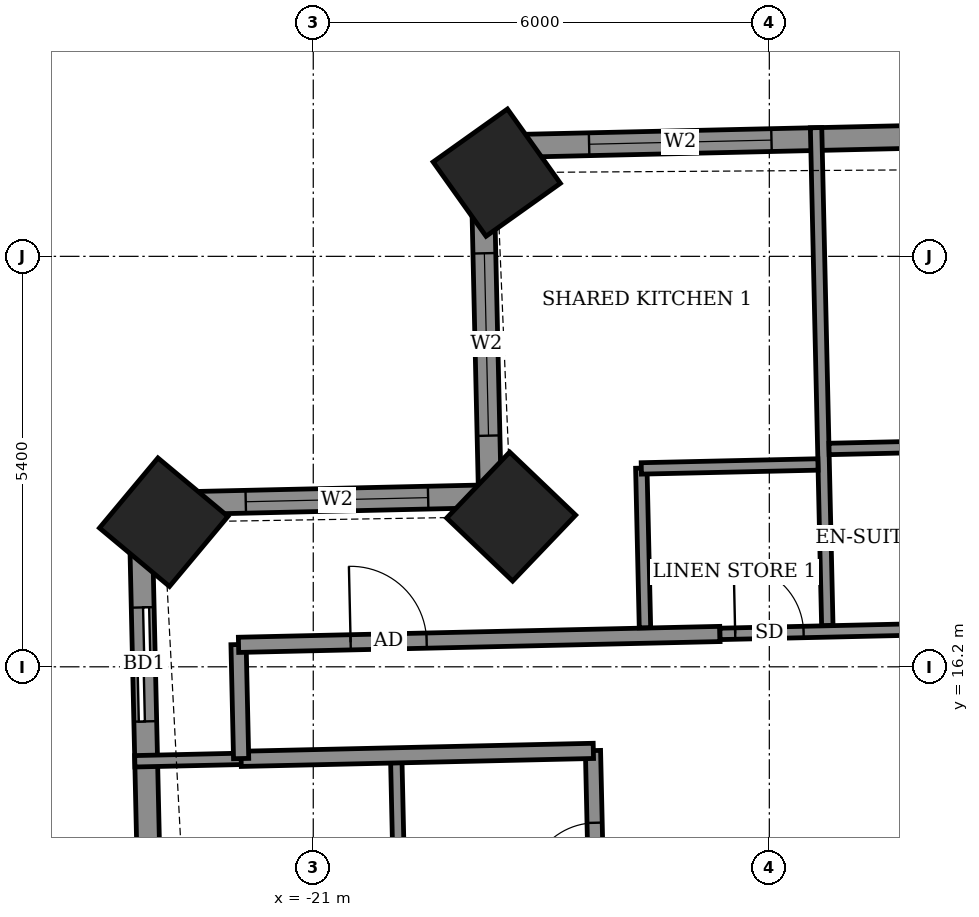
"""IFC4 building model, lengths in metres.
Left out: names, types, materials, properties, quantities, classifications, styles, units other than length and angle.
Written with IfcOpenShell. Run it as: python <this file> out.ifc"""

import sys

from ifc_helpers import new_model, si_unit, direction, frame, frame_2d, origin, origin_2d, place, context, subcontext, project, spatial, rectangle, extrude, element, fill, save


model = new_model("IFC4")
c1 = context("Model", 3, precision=1e-05, world=origin(), true_north=direction((0.0, 1.0)))
c2 = subcontext(c1, "Body", "Model", "MODEL_VIEW")
j1 = project(units=[si_unit("LENGTHUNIT", "METRE"), si_unit("PLANEANGLEUNIT", "RADIAN")], contexts=[c1])
p1 = place(None, origin())
s1 = spatial("IfcSite", under=j1, at=p1, CompositionType="ELEMENT")
p2 = place(p1, origin())
s2 = spatial("IfcBuilding", under=s1, at=p2, CompositionType="ELEMENT")
p3 = place(p2, frame((0.0, 0.0, 175.3)))
s3 = spatial("IfcBuildingStorey", under=s2, at=p3, CompositionType="ELEMENT", Elevation=175.3)
for number, where, z_axis, x_axis in (
    (1, (-18.586, 22.701, -0.55), (0.0, 0.0, 1.0), (-0.815, -0.58, 0.0)),
    (2, (-18.396, 18.177, -0.55), (0.0, 0.0, 1.0), (-0.691, -0.723, 0.0)),
    (3, (-22.968, 18.103, -0.55), (0.0, 0.0, 1.0), (-0.641, -0.768, 0.0)),
):
    element("IfcColumn", number, at=place(p3, frame(where, z_axis=z_axis, x_axis=x_axis)), inside=s3, PredefinedType="COLUMN", context=c2, shape_type="SweptSolid", body=[
        extrude(rectangle(XDim=1.2, YDim=1.2, at=origin_2d()), origin(), (0.0, 0.0, 1.0), 3.6),
    ])
p4 = place(p3, frame((21.589, 23.959, 0.0), z_axis=(0.0, 0.0, 1.0), x_axis=(-0.999742671382, -0.022684598702, 0.0)))
e4 = element("IfcWall", 4, at=p4, inside=s3, PredefinedType="SOLIDWALL", context=c2, shape_type="SweptSolid", body=[
    extrude(rectangle(XDim=40.381, YDim=0.3, at=frame_2d((20.19, 0.0))), origin(), (0.0, 0.0, 1.0), 3.05),
])
p5 = place(p4, frame((1.853, 0.0, 0.0)))
e5 = element("IfcOpeningElement", 5, at=p5, cuts=e4, PredefinedType="OPENING", context=c2, shape_type="SweptSolid", body=[
    extrude(rectangle(XDim=1.5, YDim=2.4, at=frame_2d((0.75, 1.2))), frame((0.0, 0.16, 0.0), z_axis=(0.0, -1.0, 0.0), x_axis=(1.0, 0.0, 0.0)), (0.0, 0.0, 1.0), 0.32),
])
p6 = place(p4, frame((7.38, 0.0, 0.0)))
e6 = element("IfcOpeningElement", 6, at=p6, cuts=e4, PredefinedType="OPENING", context=c2, shape_type="SweptSolid", body=[
    extrude(rectangle(XDim=1.2, YDim=2.4, at=frame_2d((0.6, 1.2))), frame((0.0, 0.16, 0.0), z_axis=(0.0, -1.0, 0.0), x_axis=(1.0, 0.0, 0.0)), (0.0, 0.0, 1.0), 0.32),
])
p7 = place(p4, frame((10.27, 0.0, 0.0)))
e7 = element("IfcOpeningElement", 7, at=p7, cuts=e4, PredefinedType="OPENING", context=c2, shape_type="SweptSolid", body=[
    extrude(rectangle(XDim=1.5, YDim=2.4, at=frame_2d((0.75, 1.2))), frame((0.0, 0.16, 0.0), z_axis=(0.0, -1.0, 0.0), x_axis=(1.0, 0.0, 0.0)), (0.0, 0.0, 1.0), 0.32),
])
p8 = place(p4, frame((15.095, 0.0, 0.0)))
e8 = element("IfcOpeningElement", 8, at=p8, cuts=e4, PredefinedType="OPENING", context=c2, shape_type="SweptSolid", body=[
    extrude(rectangle(XDim=1.5, YDim=2.4, at=frame_2d((0.75, 1.2))), frame((0.0, 0.16, 0.0), z_axis=(0.0, -1.0, 0.0), x_axis=(1.0, 0.0, 0.0)), (0.0, 0.0, 1.0), 0.32),
])
p9 = place(p4, frame((20.935, 0.0, 0.0)))
e9 = element("IfcOpeningElement", 9, at=p9, cuts=e4, PredefinedType="OPENING", context=c2, shape_type="SweptSolid", body=[
    extrude(rectangle(XDim=1.2, YDim=2.4, at=frame_2d((0.6, 1.2))), frame((0.0, 0.16, 0.0), z_axis=(0.0, -1.0, 0.0), x_axis=(1.0, 0.0, 0.0)), (0.0, 0.0, 1.0), 0.32),
])
p10 = place(p4, frame((23.825, 0.0, 0.0)))
e10 = element("IfcOpeningElement", 10, at=p10, cuts=e4, PredefinedType="OPENING", context=c2, shape_type="SweptSolid", body=[
    extrude(rectangle(XDim=1.5, YDim=2.4, at=frame_2d((0.75, 1.2))), frame((0.0, 0.16, 0.0), z_axis=(0.0, -1.0, 0.0), x_axis=(1.0, 0.0, 0.0)), (0.0, 0.0, 1.0), 0.32),
])
p11 = place(p4, frame((28.65, 0.0, 0.0)))
e11 = element("IfcOpeningElement", 11, at=p11, cuts=e4, PredefinedType="OPENING", context=c2, shape_type="SweptSolid", body=[
    extrude(rectangle(XDim=1.5, YDim=2.4, at=frame_2d((0.75, 1.2))), frame((0.0, 0.16, 0.0), z_axis=(0.0, -1.0, 0.0), x_axis=(1.0, 0.0, 0.0)), (0.0, 0.0, 1.0), 0.32),
])
p12 = place(p4, frame((31.84, 0.0, 0.0)))
e12 = element("IfcOpeningElement", 12, at=p12, cuts=e4, PredefinedType="OPENING", context=c2, shape_type="SweptSolid", body=[
    extrude(rectangle(XDim=1.2, YDim=2.4, at=frame_2d((0.6, 1.2))), frame((0.0, 0.16, 0.0), z_axis=(0.0, -1.0, 0.0), x_axis=(1.0, 0.0, 0.0)), (0.0, 0.0, 1.0), 0.32),
])
p13 = place(p4, frame((36.57, 0.0, 0.9)))
e13 = element("IfcOpeningElement", 13, at=p13, cuts=e4, PredefinedType="OPENING", context=c2, shape_type="SweptSolid", body=[
    extrude(rectangle(XDim=2.4, YDim=1.5, at=frame_2d((1.2, 0.75))), frame((0.0, 0.16, 0.0), z_axis=(0.0, -1.0, 0.0), x_axis=(1.0, 0.0, 0.0)), (0.0, 0.0, 1.0), 0.32),
])
p14 = place(p3, frame((-18.781, 23.043, 0.0), z_axis=(0.0, 0.0, 1.0), x_axis=(0.022821468877, -0.999739556364, 0.0)))
e14 = element("IfcWall", 14, at=p14, inside=s3, PredefinedType="SOLIDWALL", context=c2, shape_type="SweptSolid", body=[
    extrude(rectangle(XDim=4.6, YDim=0.3, at=frame_2d((2.3, 0.0))), origin(), (0.0, 0.0, 1.0), 2.55),
])
p15 = place(p14, frame((1.403, 0.0, 0.9)))
e15 = element("IfcOpeningElement", 15, at=p15, cuts=e14, PredefinedType="OPENING", context=c2, shape_type="SweptSolid", body=[
    extrude(rectangle(XDim=2.4, YDim=1.5, at=frame_2d((1.2, 0.75))), frame((0.0, 0.16, 0.0), z_axis=(0.0, -1.0, 0.0), x_axis=(1.0, 0.0, 0.0)), (0.0, 0.0, 1.0), 0.32),
])
p16 = place(p3, frame((-18.676, 18.444, 0.0), z_axis=(0.0, 0.0, 1.0), x_axis=(-0.999744377441, -0.022609285172, 0.0)))
e16 = element("IfcWall", 16, at=p16, inside=s3, PredefinedType="SOLIDWALL", context=c2, shape_type="SweptSolid", body=[
    extrude(rectangle(XDim=4.6, YDim=0.3, at=frame_2d((2.3, 0.0))), origin(), (0.0, 0.0, 1.0), 2.55),
])
p17 = place(p16, frame((0.813, 0.0, 0.9)))
e17 = element("IfcOpeningElement", 17, at=p17, cuts=e16, PredefinedType="OPENING", context=c2, shape_type="SweptSolid", body=[
    extrude(rectangle(XDim=2.4, YDim=1.5, at=frame_2d((1.2, 0.75))), frame((0.0, 0.16, 0.0), z_axis=(0.0, -1.0, 0.0), x_axis=(1.0, 0.0, 0.0)), (0.0, 0.0, 1.0), 0.32),
])
p18 = place(p3, frame((-23.275, 18.34, 0.0), z_axis=(0.0, 0.0, 1.0), x_axis=(0.022705985163, -0.999742185885, 0.0)))
e18 = element("IfcWall", 18, at=p18, inside=s3, PredefinedType="SOLIDWALL", context=c2, shape_type="SweptSolid", body=[
    extrude(rectangle(XDim=10.43, YDim=0.3, at=frame_2d((5.215, 0.0))), origin(), (0.0, 0.0, 1.0), 3.05),
])
p19 = place(p18, frame((1.359, 0.0, 0.0)))
e19 = element("IfcOpeningElement", 19, at=p19, cuts=e18, PredefinedType="OPENING", context=c2, shape_type="SweptSolid", body=[
    extrude(rectangle(XDim=1.5, YDim=2.4, at=frame_2d((0.75, 1.2))), frame((0.0, 0.16, 0.0), z_axis=(0.0, -1.0, 0.0), x_axis=(1.0, 0.0, 0.0)), (0.0, 0.0, 1.0), 0.32),
])
p20 = place(p18, frame((6.543, 0.0, 0.9)))
e20 = element("IfcOpeningElement", 20, at=p20, cuts=e18, PredefinedType="OPENING", context=c2, shape_type="SweptSolid", body=[
    extrude(rectangle(XDim=2.4, YDim=1.5, at=frame_2d((1.2, 0.75))), frame((0.0, 0.16, 0.0), z_axis=(0.0, -1.0, 0.0), x_axis=(1.0, 0.0, 0.0)), (0.0, 0.0, 1.0), 0.32),
])
p21 = place(p3, frame((-16.684, -12.919, 0.0), z_axis=(0.0, 0.0, 1.0), x_axis=(-0.022694293906, 0.999742451346, 0.0)))
e21 = element("IfcWall", 21, at=p21, inside=s3, PredefinedType="PARTITIONING", context=c2, shape_type="SweptSolid", body=[
    extrude(rectangle(XDim=28.024, YDim=0.2, at=frame_2d((14.012, 0.0))), origin(), (0.0, 0.0, 1.0), 3.05),
])
p22 = place(p21, frame((22.625, 0.0, 0.0)))
e22 = element("IfcOpeningElement", 22, at=p22, cuts=e21, PredefinedType="OPENING", context=c2, shape_type="SweptSolid", body=[
    extrude(rectangle(XDim=1.0, YDim=2.1, at=frame_2d((0.5, 1.05))), frame((0.0, 0.11, 0.0), z_axis=(0.0, -1.0, 0.0), x_axis=(1.0, 0.0, 0.0)), (0.0, 0.0, 1.0), 0.22),
])
p23 = place(p21, frame((26.174, 0.0, 0.0)))
e23 = element("IfcOpeningElement", 23, at=p23, cuts=e21, PredefinedType="OPENING", context=c2, shape_type="SweptSolid", body=[
    extrude(rectangle(XDim=0.9, YDim=2.1, at=frame_2d((0.45, 1.05))), frame((0.0, 0.11, 0.0), z_axis=(0.0, -1.0, 0.0), x_axis=(1.0, 0.0, 0.0)), (0.0, 0.0, 1.0), 0.22),
])
p24 = place(p21, frame((16.432, 0.0, 0.0)))
e24 = element("IfcOpeningElement", 24, at=p24, cuts=e21, PredefinedType="OPENING", context=c2, shape_type="SweptSolid", body=[
    extrude(rectangle(XDim=1.0, YDim=2.1, at=frame_2d((0.5, 1.05))), frame((0.0, 0.11, 0.0), z_axis=(0.0, -1.0, 0.0), x_axis=(1.0, 0.0, 0.0)), (0.0, 0.0, 1.0), 0.22),
])
p25 = place(p21, frame((10.975, 0.0, 0.0)))
e25 = element("IfcOpeningElement", 25, at=p25, cuts=e21, PredefinedType="OPENING", context=c2, shape_type="SweptSolid", body=[
    extrude(rectangle(XDim=1.0, YDim=2.1, at=frame_2d((0.5, 1.05))), frame((0.0, 0.11, 0.0), z_axis=(0.0, -1.0, 0.0), x_axis=(1.0, 0.0, 0.0)), (0.0, 0.0, 1.0), 0.22),
])
p26 = place(p21, frame((8.025, 0.0, 0.0)))
e26 = element("IfcOpeningElement", 26, at=p26, cuts=e21, PredefinedType="OPENING", context=c2, shape_type="SweptSolid", body=[
    extrude(rectangle(XDim=0.9, YDim=2.1, at=frame_2d((0.45, 1.05))), frame((0.0, 0.11, 0.0), z_axis=(0.0, -1.0, 0.0), x_axis=(1.0, 0.0, 0.0)), (0.0, 0.0, 1.0), 0.22),
])
p27 = place(p21, frame((5.113, 0.0, 0.0)))
e27 = element("IfcOpeningElement", 27, at=p27, cuts=e21, PredefinedType="OPENING", context=c2, shape_type="SweptSolid", body=[
    extrude(rectangle(XDim=1.0, YDim=2.1, at=frame_2d((0.5, 1.05))), frame((0.0, 0.11, 0.0), z_axis=(0.0, -1.0, 0.0), x_axis=(1.0, 0.0, 0.0)), (0.0, 0.0, 1.0), 0.22),
])
p28 = place(p3, frame((-19.846, 12.24, 0.0), z_axis=(0.0, 0.0, 1.0), x_axis=(-0.02260842146, 0.999744396973, 0.0)))
e28 = element("IfcWall", 28, at=p28, inside=s3, PredefinedType="PARTITIONING", context=c2, shape_type="SweptSolid", body=[
    extrude(rectangle(XDim=2.7, YDim=0.15, at=frame_2d((1.35, 0.0))), origin(), (0.0, 0.0, 1.0), 3.05),
])
p29 = place(p3, frame((-23.348, 14.957, 0.0), z_axis=(0.0, 0.0, 1.0), x_axis=(0.999740216184, 0.022792545827, 0.0)))
e29 = element("IfcWall", 29, at=p29, inside=s3, PredefinedType="PARTITIONING", context=c2, shape_type="SweptSolid", body=[
    extrude(rectangle(XDim=1.403, YDim=0.15, at=frame_2d((0.702, 0.0))), origin(), (0.0, 0.0, 1.0), 2.55),
])
p30 = place(p3, frame((-21.949, 14.989, 0.0), z_axis=(0.0, 0.0, 1.0), x_axis=(0.999743491588, 0.022648422179, 0.0)))
e30 = element("IfcWall", 30, at=p30, inside=s3, PredefinedType="PARTITIONING", context=c2, shape_type="SweptSolid", body=[
    extrude(rectangle(XDim=4.635, YDim=0.2, at=frame_2d((2.318, 0.0))), origin(), (0.0, 0.0, 1.0), 3.05),
])
p31 = place(p3, frame((-21.949, 14.993, 0.0), z_axis=(0.0, 0.0, 1.0), x_axis=(-0.022617910375, 0.999744182344, 0.0)))
e31 = element("IfcWall", 31, at=p31, inside=s3, PredefinedType="PARTITIONING", context=c2, shape_type="SweptSolid", body=[
    extrude(rectangle(XDim=1.5, YDim=0.2, at=frame_2d((0.75, 0.0))), origin(), (0.0, 0.0, 1.0), 3.05),
])
p32 = place(p3, frame((-21.983, 16.489, 0.0), z_axis=(0.0, 0.0, 1.0), x_axis=(0.999744930163, 0.022584831499, 0.0)))
e32 = element("IfcWall", 32, at=p32, inside=s3, PredefinedType="PARTITIONING", context=c2, shape_type="SweptSolid", body=[
    extrude(rectangle(XDim=6.335, YDim=0.2, at=frame_2d((3.167, 0.0))), origin(), (0.0, 0.0, 1.0), 3.05),
])
p33 = place(p32, frame((1.475, 0.0, 0.0)))
e33 = element("IfcOpeningElement", 33, at=p33, cuts=e32, PredefinedType="OPENING", context=c2, shape_type="SweptSolid", body=[
    extrude(rectangle(XDim=1.0, YDim=2.1, at=frame_2d((0.5, 1.05))), frame((0.0, 0.11, 0.0), z_axis=(0.0, -1.0, 0.0), x_axis=(1.0, 0.0, 0.0)), (0.0, 0.0, 1.0), 0.22),
])
p34 = place(p3, frame((-15.649, 16.633, 0.0), z_axis=(0.0, 0.0, 1.0), x_axis=(0.999743261737, 0.022658565952, 0.0)))
e34 = element("IfcWall", 34, at=p34, inside=s3, PredefinedType="PARTITIONING", context=c2, shape_type="SweptSolid", body=[
    extrude(rectangle(XDim=30.536, YDim=0.15, at=frame_2d((15.268, 0.0))), origin(), (0.0, 0.0, 1.0), 3.05),
])
p35 = place(p34, frame((24.44, 0.0, 0.0)))
e35 = element("IfcOpeningElement", 35, at=p35, cuts=e34, PredefinedType="OPENING", context=c2, shape_type="SweptSolid", body=[
    extrude(rectangle(XDim=0.9, YDim=2.1, at=frame_2d((0.45, 1.05))), frame((0.0, 0.085, 0.0), z_axis=(0.0, -1.0, 0.0), x_axis=(1.0, 0.0, 0.0)), (0.0, 0.0, 1.0), 0.17),
])
p36 = place(p34, frame((22.365, 0.0, 0.0)))
e36 = element("IfcOpeningElement", 36, at=p36, cuts=e34, PredefinedType="OPENING", context=c2, shape_type="SweptSolid", body=[
    extrude(rectangle(XDim=0.9, YDim=2.1, at=frame_2d((0.45, 1.05))), frame((0.0, 0.085, 0.0), z_axis=(0.0, -1.0, 0.0), x_axis=(1.0, 0.0, 0.0)), (0.0, 0.0, 1.0), 0.17),
])
p37 = place(p34, frame((15.515, 0.0, 0.0)))
e37 = element("IfcOpeningElement", 37, at=p37, cuts=e34, PredefinedType="OPENING", context=c2, shape_type="SweptSolid", body=[
    extrude(rectangle(XDim=0.9, YDim=2.1, at=frame_2d((0.45, 1.05))), frame((0.0, 0.085, 0.0), z_axis=(0.0, -1.0, 0.0), x_axis=(1.0, 0.0, 0.0)), (0.0, 0.0, 1.0), 0.17),
])
p38 = place(p34, frame((13.44, 0.0, 0.0)))
e38 = element("IfcOpeningElement", 38, at=p38, cuts=e34, PredefinedType="OPENING", context=c2, shape_type="SweptSolid", body=[
    extrude(rectangle(XDim=0.9, YDim=2.1, at=frame_2d((0.45, 1.05))), frame((0.0, 0.085, 0.0), z_axis=(0.0, -1.0, 0.0), x_axis=(1.0, 0.0, 0.0)), (0.0, 0.0, 1.0), 0.17),
])
p39 = place(p34, frame((6.565, 0.0, 0.0)))
e39 = element("IfcOpeningElement", 39, at=p39, cuts=e34, PredefinedType="OPENING", context=c2, shape_type="SweptSolid", body=[
    extrude(rectangle(XDim=0.9, YDim=2.1, at=frame_2d((0.45, 1.05))), frame((0.0, 0.085, 0.0), z_axis=(0.0, -1.0, 0.0), x_axis=(1.0, 0.0, 0.0)), (0.0, 0.0, 1.0), 0.17),
])
p40 = place(p34, frame((4.415, 0.0, 0.0)))
e40 = element("IfcOpeningElement", 40, at=p40, cuts=e34, PredefinedType="OPENING", context=c2, shape_type="SweptSolid", body=[
    extrude(rectangle(XDim=0.9, YDim=2.1, at=frame_2d((0.45, 1.05))), frame((0.0, 0.085, 0.0), z_axis=(0.0, -1.0, 0.0), x_axis=(1.0, 0.0, 0.0)), (0.0, 0.0, 1.0), 0.17),
])
p41 = place(p34, frame((0.2, 0.0, 0.0)))
e41 = element("IfcOpeningElement", 41, at=p41, cuts=e34, PredefinedType="OPENING", context=c2, shape_type="SweptSolid", body=[
    extrude(rectangle(XDim=0.9, YDim=2.1, at=frame_2d((0.45, 1.05))), frame((0.0, 0.085, 0.0), z_axis=(0.0, -1.0, 0.0), x_axis=(1.0, 0.0, 0.0)), (0.0, 0.0, 1.0), 0.17),
])
p42 = place(p3, frame((-16.636, 16.714, 0.0), z_axis=(0.0, 0.0, 1.0), x_axis=(-0.022898307927, 0.999737799372, 0.0)))
e42 = element("IfcWall", 42, at=p42, inside=s3, PredefinedType="PARTITIONING", context=c2, shape_type="SweptSolid", body=[
    extrude(rectangle(XDim=2.1, YDim=0.15, at=frame_2d((1.05, 0.0))), origin(), (0.0, 0.0, 1.0), 3.05),
])
p43 = place(p3, frame((-14.237, 16.744, 0.0), z_axis=(0.0, 0.0, 1.0), x_axis=(-0.022585104341, 0.999744923999, 0.0)))
e43 = element("IfcWall", 43, at=p43, inside=s3, PredefinedType="PARTITIONING", context=c2, shape_type="SweptSolid", body=[
    extrude(rectangle(XDim=6.551, YDim=0.15, at=frame_2d((3.275, 0.0))), origin(), (0.0, 0.0, 1.0), 2.55),
])
p44 = place(p3, frame((-16.684, 18.81, 0.0), z_axis=(0.0, 0.0, 1.0), x_axis=(0.999749744571, 0.022370700241, 0.0)))
e44 = element("IfcWall", 44, at=p44, inside=s3, PredefinedType="PARTITIONING", context=c2, shape_type="SweptSolid", body=[
    extrude(rectangle(XDim=2.324, YDim=0.15, at=frame_2d((1.162, 0.0))), origin(), (0.0, 0.0, 1.0), 3.05),
])
p45 = place(p3, frame((-14.214, 19.066, 0.0), z_axis=(0.0, 0.0, 1.0), x_axis=(0.999749797124, 0.022368351553, 0.0)))
e45 = element("IfcWall", 45, at=p45, inside=s3, PredefinedType="PARTITIONING", context=c2, shape_type="SweptSolid", body=[
    extrude(rectangle(XDim=2.325, YDim=0.15, at=frame_2d((1.162, 0.0))), origin(), (0.0, 0.0, 1.0), 3.05),
])
p46 = place(p13, origin())
e46 = element("IfcWindow", 46, at=p46, inside=s3, PartitioningType="DOUBLE_PANEL_VERTICAL", PredefinedType="WINDOW", context=c2, shape_type="SweptSolid", body=[
    extrude(rectangle(XDim=2.4, YDim=1.5, at=frame_2d((1.2, 0.75))), frame((0.0, 0.03, 0.0), z_axis=(0.0, -1.0, 0.0), x_axis=(1.0, 0.0, 0.0)), (0.0, 0.0, 1.0), 0.06),
])
fill(e13, e46)
p47 = place(p15, origin())
e47 = element("IfcWindow", 47, at=p47, inside=s3, PartitioningType="DOUBLE_PANEL_VERTICAL", PredefinedType="WINDOW", context=c2, shape_type="SweptSolid", body=[
    extrude(rectangle(XDim=2.4, YDim=1.5, at=frame_2d((1.2, 0.75))), frame((0.0, 0.03, 0.0), z_axis=(0.0, -1.0, 0.0), x_axis=(1.0, 0.0, 0.0)), (0.0, 0.0, 1.0), 0.06),
])
fill(e15, e47)
p48 = place(p17, origin())
e48 = element("IfcWindow", 48, at=p48, inside=s3, PartitioningType="DOUBLE_PANEL_VERTICAL", PredefinedType="WINDOW", context=c2, shape_type="SweptSolid", body=[
    extrude(rectangle(XDim=2.4, YDim=1.5, at=frame_2d((1.2, 0.75))), frame((0.0, 0.03, 0.0), z_axis=(0.0, -1.0, 0.0), x_axis=(1.0, 0.0, 0.0)), (0.0, 0.0, 1.0), 0.06),
])
fill(e17, e48)
p49 = place(p19, origin())
e49 = element("IfcDoor", 49, at=p49, inside=s3, OperationType="SLIDING_TO_LEFT", PredefinedType="DOOR", context=c2, shape_type="SweptSolid", body=[
    extrude(rectangle(XDim=1.5, YDim=2.4, at=frame_2d((0.75, 1.2))), frame((0.0, 0.025, 0.0), z_axis=(0.0, -1.0, 0.0), x_axis=(1.0, 0.0, 0.0)), (0.0, 0.0, 1.0), 0.05),
])
fill(e19, e49)
p50 = place(p33, origin())
e50 = element("IfcDoor", 50, at=p50, inside=s3, OperationType="SINGLE_SWING_RIGHT", PredefinedType="DOOR", context=c2, shape_type="SweptSolid", body=[
    extrude(rectangle(XDim=1.0, YDim=2.1, at=frame_2d((0.5, 1.05))), frame((0.0, 0.025, 0.0), z_axis=(0.0, -1.0, 0.0), x_axis=(1.0, 0.0, 0.0)), (0.0, 0.0, 1.0), 0.05),
])
fill(e33, e50)
p51 = place(p41, origin())
e51 = element("IfcDoor", 51, at=p51, inside=s3, OperationType="SINGLE_SWING_RIGHT", PredefinedType="DOOR", context=c2, shape_type="SweptSolid", body=[
    extrude(rectangle(XDim=0.9, YDim=2.1, at=frame_2d((0.45, 1.05))), frame((0.0, 0.025, 0.0), z_axis=(0.0, -1.0, 0.0), x_axis=(1.0, 0.0, 0.0)), (0.0, 0.0, 1.0), 0.05),
])
fill(e41, e51)
p52 = place(p23, origin())
e52 = element("IfcDoor", 52, at=p52, inside=s3, OperationType="SINGLE_SWING_LEFT", PredefinedType="DOOR", context=c2, shape_type="SweptSolid", body=[
    extrude(rectangle(XDim=0.9, YDim=2.1, at=frame_2d((0.45, 1.05))), frame((0.0, 0.025, 0.0), z_axis=(0.0, -1.0, 0.0), x_axis=(1.0, 0.0, 0.0)), (0.0, 0.0, 1.0), 0.05),
])
fill(e23, e52)
save(model, sys.argv[1])
